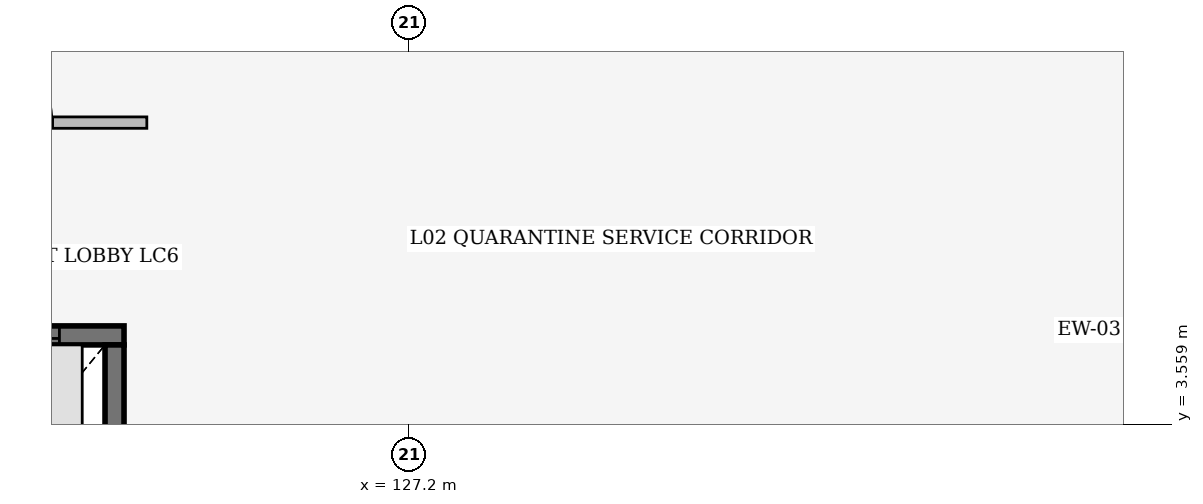
"""IFC4 building model, lengths in metres.
Left out: names, types, materials, properties, quantities, classifications, styles, units other than length and angle.
Written with IfcOpenShell. Run it as: python <this file> out.ifc"""

import sys

from ifc_helpers import new_model, si_unit, direction, frame, frame_2d, origin, place, context, subcontext, project, spatial, rectangle, extrude, element, fill, save


model = new_model("IFC4")
c1 = context("Model", 3, precision=1e-05, world=origin(), true_north=direction((0.0, 1.0)))
c2 = subcontext(c1, "Body", "Model", "MODEL_VIEW")
j1 = project(units=[si_unit("LENGTHUNIT", "METRE"), si_unit("PLANEANGLEUNIT", "RADIAN")], contexts=[c1])
p1 = place(None, origin())
s1 = spatial("IfcSite", under=j1, at=p1, CompositionType="ELEMENT")
p2 = place(p1, origin())
s2 = spatial("IfcBuilding", under=s1, at=p2, CompositionType="ELEMENT")
p3 = place(p2, frame((0.0, 0.0, 10.5)))
s3 = spatial("IfcBuildingStorey", under=s2, at=p3, CompositionType="ELEMENT", Elevation=10.5)
p4 = place(p3, frame((120.15, 4.725, 0.0), z_axis=(0.0, 0.0, 1.0), x_axis=(1.0, 0.0, 0.0)))
e1 = element("IfcWall", 1, at=p4, inside=s3, PredefinedType="SHEAR", context=c2, shape_type="SweptSolid", body=[
    extrude(rectangle(XDim=3.3, YDim=0.25, at=frame_2d((1.65, 0.0))), origin(), (0.0, 0.0, 1.0), 4.52),
])
p5 = place(p4, frame((0.85, 0.0, 0.0)))
e2 = element("IfcOpeningElement", 2, at=p5, cuts=e1, PredefinedType="OPENING", context=c2, shape_type="SweptSolid", body=[
    extrude(rectangle(XDim=1.6, YDim=2.3, at=frame_2d((0.8, 1.15))), frame((0.0, 0.135, 0.0), z_axis=(0.0, -1.0, 0.0), x_axis=(1.0, 0.0, 0.0)), (0.0, 0.0, 1.0), 0.27),
])
p6 = place(p3, frame((123.325, 1.2, 0.0), z_axis=(0.0, 0.0, 1.0), x_axis=(0.0, 1.0, 0.0)))
e3 = element("IfcWall", 3, at=p6, inside=s3, PredefinedType="SHEAR", context=c2, shape_type="SweptSolid", body=[
    extrude(rectangle(XDim=3.4, YDim=0.25, at=frame_2d((1.7, 0.0))), origin(), (0.0, 0.0, 1.0), 4.52),
])
p7 = place(p3, frame((120.05, 7.525, 0.0), z_axis=(0.0, 0.0, 1.0), x_axis=(1.0, 0.0, 0.0)))
e4 = element("IfcWall", 4, at=p7, inside=s3, PredefinedType="PARTITIONING", context=c2, shape_type="SweptSolid", body=[
    extrude(rectangle(XDim=3.7, YDim=0.15, at=frame_2d((1.85, 0.0))), origin(), (0.0, 0.0, 1.0), 4.176),
])
p8 = place(p7, frame((1.24, 0.0, 0.0)))
e5 = element("IfcOpeningElement", 5, at=p8, cuts=e4, PredefinedType="OPENING", context=c2, shape_type="SweptSolid", body=[
    extrude(rectangle(XDim=1.22, YDim=2.25, at=frame_2d((0.61, 1.125))), frame((0.0, 0.085, 0.0), z_axis=(0.0, -1.0, 0.0), x_axis=(1.0, 0.0, 0.0)), (0.0, 0.0, 1.0), 0.17),
])
p9 = place(p5, origin())
e6 = element("IfcDoor", 6, at=p9, inside=s3, OperationType="DOUBLE_DOOR_SLIDING", PredefinedType="DOOR", context=c2, shape_type="SweptSolid", body=[
    extrude(rectangle(XDim=1.6, YDim=2.3, at=frame_2d((0.8, 1.15))), frame((0.0, 0.025, 0.0), z_axis=(0.0, -1.0, 0.0), x_axis=(1.0, 0.0, 0.0)), (0.0, 0.0, 1.0), 0.05),
])
fill(e2, e6)
save(model, sys.argv[1])
